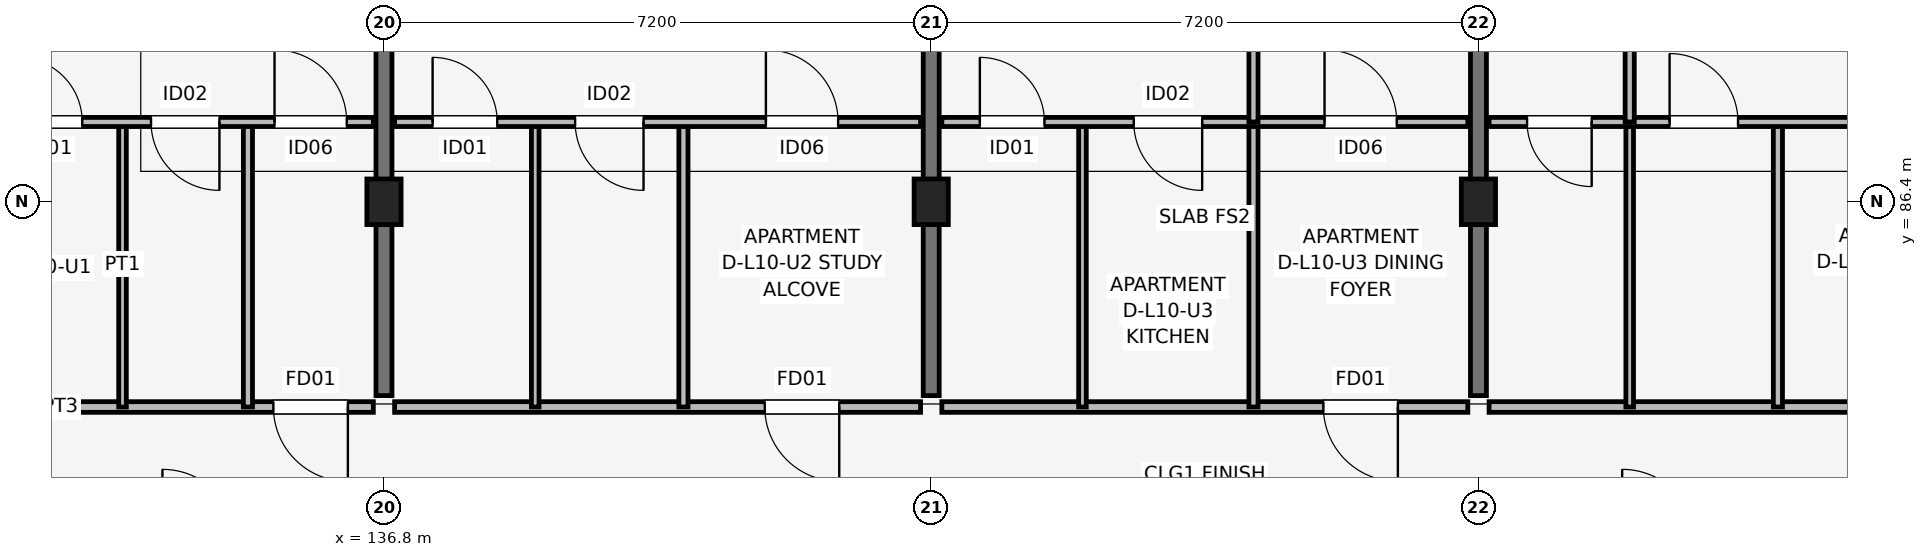
"""IFC4 building model, lengths in metres.
Left out: names, types, materials, properties, quantities, classifications, styles, units other than length and angle.
Written with IfcOpenShell. Run it as: python <this file> out.ifc"""

import sys

from ifc_helpers import new_model, si_unit, direction, frame, frame_2d, origin, origin_2d, place, context, subcontext, project, spatial, rectangle, extrude, element, fill, save


model = new_model("IFC4")
c1 = context("Model", 3, precision=1e-05, world=origin(), true_north=direction((0.0, 1.0)))
c2 = subcontext(c1, "Body", "Model", "MODEL_VIEW")
j1 = project(units=[si_unit("LENGTHUNIT", "METRE"), si_unit("PLANEANGLEUNIT", "RADIAN")], contexts=[c1])
p1 = place(None, origin())
s1 = spatial("IfcSite", under=j1, at=p1, CompositionType="ELEMENT")
p2 = place(p1, origin())
s2 = spatial("IfcBuilding", under=s1, at=p2, CompositionType="ELEMENT")
p3 = place(p2, frame((0.0, 0.0, 33.9)))
s3 = spatial("IfcBuildingStorey", under=s2, at=p3, CompositionType="ELEMENT", Elevation=33.9)
for number, where, z_axis, x_axis in (
    (1, (136.8, 86.4, 0.0), (0.0, 0.0, 1.0), (1.0, 0.0, 0.0)),
    (2, (144.0, 86.4, 0.0), (0.0, 0.0, 1.0), (1.0, 0.0, 0.0)),
    (3, (151.2, 86.4, 0.0), (0.0, 0.0, 1.0), (1.0, 0.0, 0.0)),
):
    element("IfcColumn", number, at=place(p3, frame(where, z_axis=z_axis, x_axis=x_axis)), inside=s3, PredefinedType="COLUMN", context=c2, shape_type="SweptSolid", body=[
        extrude(rectangle(XDim=0.45, YDim=0.6, at=origin_2d()), origin(), (0.0, 0.0, 1.0), 3.15),
    ])
for number, where, z_axis, x_axis in (
    (4, (136.8, 83.85, 0.0), (0.0, 0.0, 1.0), (0.0, 1.0, 0.0)),
    (5, (144.0, 83.85, 0.0), (0.0, 0.0, 1.0), (0.0, 1.0, 0.0)),
    (6, (151.2, 83.85, 0.0), (0.0, 0.0, 1.0), (0.0, 1.0, 0.0)),
):
    element("IfcWall", number, at=place(p3, frame(where, z_axis=z_axis, x_axis=x_axis)), inside=s3, PredefinedType="SHEAR", context=c2, shape_type="SweptSolid", body=[
        extrude(rectangle(XDim=9.4, YDim=0.21, at=frame_2d((4.7, 0.0))), origin(), (0.0, 0.0, 1.0), 3.15),
    ])
p4 = place(p3, frame((129.74, 83.7, 0.0), z_axis=(0.0, 0.0, 1.0), x_axis=(1.0, 0.0, 0.0)))
e7 = element("IfcWall", 7, at=p4, inside=s3, PredefinedType="PARTITIONING", context=c2, shape_type="SweptSolid", body=[
    extrude(rectangle(XDim=6.92, YDim=0.14, at=frame_2d((3.46, 0.0))), origin(), (0.0, 0.0, 1.0), 2.38),
])
p5 = place(p4, frame((6.585, 0.0, 0.0), z_axis=(0.0, 0.0, 1.0), x_axis=(-1.0, 0.0, 0.0)))
e8 = element("IfcOpeningElement", 8, at=p5, cuts=e7, PredefinedType="OPENING", context=c2, shape_type="SweptSolid", body=[
    extrude(rectangle(XDim=0.98, YDim=2.1, at=frame_2d((0.49, 1.05))), frame((0.0, 0.08, 0.0), z_axis=(0.0, -1.0, 0.0), x_axis=(1.0, 0.0, 0.0)), (0.0, 0.0, 1.0), 0.16),
])
p6 = place(p3, frame((133.36, 83.7, 0.0), z_axis=(0.0, 0.0, 1.0), x_axis=(0.0, 1.0, 0.0)))
e9 = element("IfcWall", 9, at=p6, inside=s3, PredefinedType="PARTITIONING", context=c2, shape_type="SweptSolid", body=[
    extrude(rectangle(XDim=3.75, YDim=0.1, at=frame_2d((1.875, 0.0))), origin(), (0.0, 0.0, 1.0), 2.38),
])
p7 = place(p3, frame((135.01, 83.7, 0.0), z_axis=(0.0, 0.0, 1.0), x_axis=(0.0, 1.0, 0.0)))
e10 = element("IfcWall", 10, at=p7, inside=s3, PredefinedType="PARTITIONING", context=c2, shape_type="SweptSolid", body=[
    extrude(rectangle(XDim=3.75, YDim=0.12, at=frame_2d((1.875, 0.0))), origin(), (0.0, 0.0, 1.0), 2.38),
])
p8 = place(p3, frame((129.74, 87.45, 0.0), z_axis=(0.0, 0.0, 1.0), x_axis=(1.0, 0.0, 0.0)))
e11 = element("IfcWall", 11, at=p8, inside=s3, PredefinedType="PARTITIONING", context=c2, shape_type="SweptSolid", body=[
    extrude(rectangle(XDim=6.92, YDim=0.12, at=frame_2d((3.46, 0.0))), origin(), (0.0, 0.0, 1.0), 2.38),
])
p9 = place(p8, frame((2.24, 0.0, 0.0)))
e12 = element("IfcOpeningElement", 12, at=p9, cuts=e11, PredefinedType="OPENING", context=c2, shape_type="SweptSolid", body=[
    extrude(rectangle(XDim=0.85, YDim=2.08, at=frame_2d((0.425, 1.04))), frame((0.0, 0.07, 0.0), z_axis=(0.0, -1.0, 0.0), x_axis=(1.0, 0.0, 0.0)), (0.0, 0.0, 1.0), 0.14),
])
p10 = place(p8, frame((4.895, 0.0, 0.0), z_axis=(0.0, 0.0, 1.0), x_axis=(-1.0, 0.0, 0.0)))
e13 = element("IfcOpeningElement", 13, at=p10, cuts=e11, PredefinedType="OPENING", context=c2, shape_type="SweptSolid", body=[
    extrude(rectangle(XDim=0.9, YDim=2.08, at=frame_2d((0.45, 1.04))), frame((0.0, 0.07, 0.0), z_axis=(0.0, -1.0, 0.0), x_axis=(1.0, 0.0, 0.0)), (0.0, 0.0, 1.0), 0.14),
])
p11 = place(p8, frame((5.62, 0.0, 0.0)))
e14 = element("IfcOpeningElement", 14, at=p11, cuts=e11, PredefinedType="OPENING", context=c2, shape_type="SweptSolid", body=[
    extrude(rectangle(XDim=0.95, YDim=2.08, at=frame_2d((0.475, 1.04))), frame((0.0, 0.07, 0.0), z_axis=(0.0, -1.0, 0.0), x_axis=(1.0, 0.0, 0.0)), (0.0, 0.0, 1.0), 0.14),
])
p12 = place(p3, frame((136.94, 83.7, 0.0), z_axis=(0.0, 0.0, 1.0), x_axis=(1.0, 0.0, 0.0)))
e15 = element("IfcWall", 15, at=p12, inside=s3, PredefinedType="PARTITIONING", context=c2, shape_type="SweptSolid", body=[
    extrude(rectangle(XDim=6.92, YDim=0.14, at=frame_2d((3.46, 0.0))), origin(), (0.0, 0.0, 1.0), 2.38),
])
p13 = place(p12, frame((5.85, 0.0, 0.0), z_axis=(0.0, 0.0, 1.0), x_axis=(-1.0, 0.0, 0.0)))
e16 = element("IfcOpeningElement", 16, at=p13, cuts=e15, PredefinedType="OPENING", context=c2, shape_type="SweptSolid", body=[
    extrude(rectangle(XDim=0.98, YDim=2.1, at=frame_2d((0.49, 1.05))), frame((0.0, 0.08, 0.0), z_axis=(0.0, -1.0, 0.0), x_axis=(1.0, 0.0, 0.0)), (0.0, 0.0, 1.0), 0.16),
])
p14 = place(p3, frame((138.79, 83.7, 0.0), z_axis=(0.0, 0.0, 1.0), x_axis=(0.0, 1.0, 0.0)))
e17 = element("IfcWall", 17, at=p14, inside=s3, PredefinedType="PARTITIONING", context=c2, shape_type="SweptSolid", body=[
    extrude(rectangle(XDim=3.75, YDim=0.1, at=frame_2d((1.875, 0.0))), origin(), (0.0, 0.0, 1.0), 2.38),
])
p15 = place(p3, frame((140.74, 83.7, 0.0), z_axis=(0.0, 0.0, 1.0), x_axis=(0.0, 1.0, 0.0)))
e18 = element("IfcWall", 18, at=p15, inside=s3, PredefinedType="PARTITIONING", context=c2, shape_type="SweptSolid", body=[
    extrude(rectangle(XDim=3.75, YDim=0.12, at=frame_2d((1.875, 0.0))), origin(), (0.0, 0.0, 1.0), 2.38),
])
p16 = place(p3, frame((136.94, 87.45, 0.0), z_axis=(0.0, 0.0, 1.0), x_axis=(1.0, 0.0, 0.0)))
e19 = element("IfcWall", 19, at=p16, inside=s3, PredefinedType="PARTITIONING", context=c2, shape_type="SweptSolid", body=[
    extrude(rectangle(XDim=6.92, YDim=0.12, at=frame_2d((3.46, 0.0))), origin(), (0.0, 0.0, 1.0), 2.38),
])
p17 = place(p16, frame((0.5, 0.0, 0.0)))
e20 = element("IfcOpeningElement", 20, at=p17, cuts=e19, PredefinedType="OPENING", context=c2, shape_type="SweptSolid", body=[
    extrude(rectangle(XDim=0.85, YDim=2.08, at=frame_2d((0.425, 1.04))), frame((0.0, 0.07, 0.0), z_axis=(0.0, -1.0, 0.0), x_axis=(1.0, 0.0, 0.0)), (0.0, 0.0, 1.0), 0.14),
])
p18 = place(p16, frame((3.275, 0.0, 0.0), z_axis=(0.0, 0.0, 1.0), x_axis=(-1.0, 0.0, 0.0)))
e21 = element("IfcOpeningElement", 21, at=p18, cuts=e19, PredefinedType="OPENING", context=c2, shape_type="SweptSolid", body=[
    extrude(rectangle(XDim=0.9, YDim=2.08, at=frame_2d((0.45, 1.04))), frame((0.0, 0.07, 0.0), z_axis=(0.0, -1.0, 0.0), x_axis=(1.0, 0.0, 0.0)), (0.0, 0.0, 1.0), 0.14),
])
p19 = place(p16, frame((4.885, 0.0, 0.0)))
e22 = element("IfcOpeningElement", 22, at=p19, cuts=e19, PredefinedType="OPENING", context=c2, shape_type="SweptSolid", body=[
    extrude(rectangle(XDim=0.95, YDim=2.08, at=frame_2d((0.475, 1.04))), frame((0.0, 0.07, 0.0), z_axis=(0.0, -1.0, 0.0), x_axis=(1.0, 0.0, 0.0)), (0.0, 0.0, 1.0), 0.14),
])
p20 = place(p3, frame((144.14, 83.7, 0.0), z_axis=(0.0, 0.0, 1.0), x_axis=(1.0, 0.0, 0.0)))
e23 = element("IfcWall", 23, at=p20, inside=s3, PredefinedType="PARTITIONING", context=c2, shape_type="SweptSolid", body=[
    extrude(rectangle(XDim=6.92, YDim=0.14, at=frame_2d((3.46, 0.0))), origin(), (0.0, 0.0, 1.0), 2.38),
])
p21 = place(p20, frame((6.0, 0.0, 0.0), z_axis=(0.0, 0.0, 1.0), x_axis=(-1.0, 0.0, 0.0)))
e24 = element("IfcOpeningElement", 24, at=p21, cuts=e23, PredefinedType="OPENING", context=c2, shape_type="SweptSolid", body=[
    extrude(rectangle(XDim=0.98, YDim=2.1, at=frame_2d((0.49, 1.05))), frame((0.0, 0.08, 0.0), z_axis=(0.0, -1.0, 0.0), x_axis=(1.0, 0.0, 0.0)), (0.0, 0.0, 1.0), 0.16),
])
p22 = place(p3, frame((145.99, 83.7, 0.0), z_axis=(0.0, 0.0, 1.0), x_axis=(0.0, 1.0, 0.0)))
e25 = element("IfcWall", 25, at=p22, inside=s3, PredefinedType="PARTITIONING", context=c2, shape_type="SweptSolid", body=[
    extrude(rectangle(XDim=3.75, YDim=0.1, at=frame_2d((1.875, 0.0))), origin(), (0.0, 0.0, 1.0), 2.38),
])
p23 = place(p3, frame((148.24, 83.7, 0.0), z_axis=(0.0, 0.0, 1.0), x_axis=(0.0, 1.0, 0.0)))
e26 = element("IfcWall", 26, at=p23, inside=s3, PredefinedType="PARTITIONING", context=c2, shape_type="SweptSolid", body=[
    extrude(rectangle(XDim=3.75, YDim=0.12, at=frame_2d((1.875, 0.0))), origin(), (0.0, 0.0, 1.0), 2.38),
])
p24 = place(p3, frame((144.14, 87.45, 0.0), z_axis=(0.0, 0.0, 1.0), x_axis=(1.0, 0.0, 0.0)))
e27 = element("IfcWall", 27, at=p24, inside=s3, PredefinedType="PARTITIONING", context=c2, shape_type="SweptSolid", body=[
    extrude(rectangle(XDim=6.92, YDim=0.12, at=frame_2d((3.46, 0.0))), origin(), (0.0, 0.0, 1.0), 2.38),
])
p25 = place(p24, frame((0.5, 0.0, 0.0)))
e28 = element("IfcOpeningElement", 28, at=p25, cuts=e27, PredefinedType="OPENING", context=c2, shape_type="SweptSolid", body=[
    extrude(rectangle(XDim=0.85, YDim=2.08, at=frame_2d((0.425, 1.04))), frame((0.0, 0.07, 0.0), z_axis=(0.0, -1.0, 0.0), x_axis=(1.0, 0.0, 0.0)), (0.0, 0.0, 1.0), 0.14),
])
p26 = place(p24, frame((3.425, 0.0, 0.0), z_axis=(0.0, 0.0, 1.0), x_axis=(-1.0, 0.0, 0.0)))
e29 = element("IfcOpeningElement", 29, at=p26, cuts=e27, PredefinedType="OPENING", context=c2, shape_type="SweptSolid", body=[
    extrude(rectangle(XDim=0.9, YDim=2.08, at=frame_2d((0.45, 1.04))), frame((0.0, 0.07, 0.0), z_axis=(0.0, -1.0, 0.0), x_axis=(1.0, 0.0, 0.0)), (0.0, 0.0, 1.0), 0.14),
])
p27 = place(p24, frame((5.035, 0.0, 0.0)))
e30 = element("IfcOpeningElement", 30, at=p27, cuts=e27, PredefinedType="OPENING", context=c2, shape_type="SweptSolid", body=[
    extrude(rectangle(XDim=0.95, YDim=2.08, at=frame_2d((0.475, 1.04))), frame((0.0, 0.07, 0.0), z_axis=(0.0, -1.0, 0.0), x_axis=(1.0, 0.0, 0.0)), (0.0, 0.0, 1.0), 0.14),
])
p28 = place(p3, frame((148.24, 87.45, 0.0), z_axis=(0.0, 0.0, 1.0), x_axis=(0.0, 1.0, 0.0)))
e31 = element("IfcWall", 31, at=p28, inside=s3, PredefinedType="PARTITIONING", context=c2, shape_type="SweptSolid", body=[
    extrude(rectangle(XDim=5.85, YDim=0.12, at=frame_2d((2.925, 0.0))), origin(), (0.0, 0.0, 1.0), 2.38),
])
p29 = place(p28, frame((3.375, 0.0, 0.0), z_axis=(0.0, 0.0, 1.0), x_axis=(-1.0, 0.0, 0.0)))
e32 = element("IfcOpeningElement", 32, at=p29, cuts=e31, PredefinedType="OPENING", context=c2, shape_type="SweptSolid", body=[
    extrude(rectangle(XDim=0.9, YDim=2.08, at=frame_2d((0.45, 1.04))), frame((0.0, 0.07, 0.0), z_axis=(0.0, -1.0, 0.0), x_axis=(1.0, 0.0, 0.0)), (0.0, 0.0, 1.0), 0.14),
])
p30 = place(p3, frame((151.34, 83.7, 0.0), z_axis=(0.0, 0.0, 1.0), x_axis=(1.0, 0.0, 0.0)))
e33 = element("IfcWall", 33, at=p30, inside=s3, PredefinedType="PARTITIONING", context=c2, shape_type="SweptSolid", body=[
    extrude(rectangle(XDim=6.92, YDim=0.14, at=frame_2d((3.46, 0.0))), origin(), (0.0, 0.0, 1.0), 2.38),
])
p31 = place(p30, frame((4.87, 0.0, 0.0)))
e34 = element("IfcOpeningElement", 34, at=p31, cuts=e33, PredefinedType="OPENING", context=c2, shape_type="SweptSolid", body=[
    extrude(rectangle(XDim=0.98, YDim=2.1, at=frame_2d((0.49, 1.05))), frame((0.0, 0.08, 0.0), z_axis=(0.0, -1.0, 0.0), x_axis=(1.0, 0.0, 0.0)), (0.0, 0.0, 1.0), 0.16),
])
p32 = place(p3, frame((153.19, 83.7, 0.0), z_axis=(0.0, 0.0, 1.0), x_axis=(0.0, 1.0, 0.0)))
e35 = element("IfcWall", 35, at=p32, inside=s3, PredefinedType="PARTITIONING", context=c2, shape_type="SweptSolid", body=[
    extrude(rectangle(XDim=3.75, YDim=0.1, at=frame_2d((1.875, 0.0))), origin(), (0.0, 0.0, 1.0), 2.38),
])
p33 = place(p3, frame((155.14, 83.7, 0.0), z_axis=(0.0, 0.0, 1.0), x_axis=(0.0, 1.0, 0.0)))
e36 = element("IfcWall", 36, at=p33, inside=s3, PredefinedType="PARTITIONING", context=c2, shape_type="SweptSolid", body=[
    extrude(rectangle(XDim=3.75, YDim=0.12, at=frame_2d((1.875, 0.0))), origin(), (0.0, 0.0, 1.0), 2.38),
])
p34 = place(p3, frame((151.34, 87.45, 0.0), z_axis=(0.0, 0.0, 1.0), x_axis=(1.0, 0.0, 0.0)))
e37 = element("IfcWall", 37, at=p34, inside=s3, PredefinedType="PARTITIONING", context=c2, shape_type="SweptSolid", body=[
    extrude(rectangle(XDim=6.92, YDim=0.12, at=frame_2d((3.46, 0.0))), origin(), (0.0, 0.0, 1.0), 2.38),
])
p35 = place(p34, frame((1.35, 0.0, 0.0), z_axis=(0.0, 0.0, 1.0), x_axis=(-1.0, 0.0, 0.0)))
e38 = element("IfcOpeningElement", 38, at=p35, cuts=e37, PredefinedType="OPENING", context=c2, shape_type="SweptSolid", body=[
    extrude(rectangle(XDim=0.85, YDim=2.08, at=frame_2d((0.425, 1.04))), frame((0.0, 0.07, 0.0), z_axis=(0.0, -1.0, 0.0), x_axis=(1.0, 0.0, 0.0)), (0.0, 0.0, 1.0), 0.14),
])
p36 = place(p34, frame((2.375, 0.0, 0.0)))
e39 = element("IfcOpeningElement", 39, at=p36, cuts=e37, PredefinedType="OPENING", context=c2, shape_type="SweptSolid", body=[
    extrude(rectangle(XDim=0.9, YDim=2.08, at=frame_2d((0.45, 1.04))), frame((0.0, 0.07, 0.0), z_axis=(0.0, -1.0, 0.0), x_axis=(1.0, 0.0, 0.0)), (0.0, 0.0, 1.0), 0.14),
])
p37 = place(p34, frame((5.835, 0.0, 0.0), z_axis=(0.0, 0.0, 1.0), x_axis=(-1.0, 0.0, 0.0)))
e40 = element("IfcOpeningElement", 40, at=p37, cuts=e37, PredefinedType="OPENING", context=c2, shape_type="SweptSolid", body=[
    extrude(rectangle(XDim=0.95, YDim=2.08, at=frame_2d((0.475, 1.04))), frame((0.0, 0.07, 0.0), z_axis=(0.0, -1.0, 0.0), x_axis=(1.0, 0.0, 0.0)), (0.0, 0.0, 1.0), 0.14),
])
p38 = place(p3, frame((153.19, 87.45, 0.0), z_axis=(0.0, 0.0, 1.0), x_axis=(0.0, 1.0, 0.0)))
e41 = element("IfcWall", 41, at=p38, inside=s3, PredefinedType="PARTITIONING", context=c2, shape_type="SweptSolid", body=[
    extrude(rectangle(XDim=5.85, YDim=0.12, at=frame_2d((2.925, 0.0))), origin(), (0.0, 0.0, 1.0), 2.38),
])
p39 = place(p38, frame((2.475, 0.0, 0.0)))
e42 = element("IfcOpeningElement", 42, at=p39, cuts=e41, PredefinedType="OPENING", context=c2, shape_type="SweptSolid", body=[
    extrude(rectangle(XDim=0.9, YDim=2.08, at=frame_2d((0.45, 1.04))), frame((0.0, 0.07, 0.0), z_axis=(0.0, -1.0, 0.0), x_axis=(1.0, 0.0, 0.0)), (0.0, 0.0, 1.0), 0.14),
])
p40 = place(p5, origin())
e43 = element("IfcDoor", 43, at=p40, inside=s3, OperationType="SINGLE_SWING_RIGHT", PredefinedType="DOOR", context=c2, shape_type="SweptSolid", body=[
    extrude(rectangle(XDim=0.98, YDim=2.1, at=frame_2d((0.49, 1.05))), frame((0.0, 0.025, 0.0), z_axis=(0.0, -1.0, 0.0), x_axis=(1.0, 0.0, 0.0)), (0.0, 0.0, 1.0), 0.05),
])
fill(e8, e43)
p41 = place(p9, origin())
e44 = element("IfcDoor", 44, at=p41, inside=s3, OperationType="SINGLE_SWING_LEFT", PredefinedType="DOOR", context=c2, shape_type="SweptSolid", body=[
    extrude(rectangle(XDim=0.85, YDim=2.08, at=frame_2d((0.425, 1.04))), frame((0.0, 0.025, 0.0), z_axis=(0.0, -1.0, 0.0), x_axis=(1.0, 0.0, 0.0)), (0.0, 0.0, 1.0), 0.05),
])
fill(e12, e44)
p42 = place(p10, origin())
e45 = element("IfcDoor", 45, at=p42, inside=s3, OperationType="SINGLE_SWING_RIGHT", PredefinedType="DOOR", context=c2, shape_type="SweptSolid", body=[
    extrude(rectangle(XDim=0.9, YDim=2.08, at=frame_2d((0.45, 1.04))), frame((0.0, 0.025, 0.0), z_axis=(0.0, -1.0, 0.0), x_axis=(1.0, 0.0, 0.0)), (0.0, 0.0, 1.0), 0.05),
])
fill(e13, e45)
p43 = place(p11, origin())
e46 = element("IfcDoor", 46, at=p43, inside=s3, OperationType="SINGLE_SWING_LEFT", PredefinedType="DOOR", context=c2, shape_type="SweptSolid", body=[
    extrude(rectangle(XDim=0.95, YDim=2.08, at=frame_2d((0.475, 1.04))), frame((0.0, 0.025, 0.0), z_axis=(0.0, -1.0, 0.0), x_axis=(1.0, 0.0, 0.0)), (0.0, 0.0, 1.0), 0.05),
])
fill(e14, e46)
p44 = place(p13, origin())
e47 = element("IfcDoor", 47, at=p44, inside=s3, OperationType="SINGLE_SWING_RIGHT", PredefinedType="DOOR", context=c2, shape_type="SweptSolid", body=[
    extrude(rectangle(XDim=0.98, YDim=2.1, at=frame_2d((0.49, 1.05))), frame((0.0, 0.025, 0.0), z_axis=(0.0, -1.0, 0.0), x_axis=(1.0, 0.0, 0.0)), (0.0, 0.0, 1.0), 0.05),
])
fill(e16, e47)
p45 = place(p17, origin())
e48 = element("IfcDoor", 48, at=p45, inside=s3, OperationType="SINGLE_SWING_LEFT", PredefinedType="DOOR", context=c2, shape_type="SweptSolid", body=[
    extrude(rectangle(XDim=0.85, YDim=2.08, at=frame_2d((0.425, 1.04))), frame((0.0, 0.025, 0.0), z_axis=(0.0, -1.0, 0.0), x_axis=(1.0, 0.0, 0.0)), (0.0, 0.0, 1.0), 0.05),
])
fill(e20, e48)
p46 = place(p18, origin())
e49 = element("IfcDoor", 49, at=p46, inside=s3, OperationType="SINGLE_SWING_RIGHT", PredefinedType="DOOR", context=c2, shape_type="SweptSolid", body=[
    extrude(rectangle(XDim=0.9, YDim=2.08, at=frame_2d((0.45, 1.04))), frame((0.0, 0.025, 0.0), z_axis=(0.0, -1.0, 0.0), x_axis=(1.0, 0.0, 0.0)), (0.0, 0.0, 1.0), 0.05),
])
fill(e21, e49)
p47 = place(p19, origin())
e50 = element("IfcDoor", 50, at=p47, inside=s3, OperationType="SINGLE_SWING_LEFT", PredefinedType="DOOR", context=c2, shape_type="SweptSolid", body=[
    extrude(rectangle(XDim=0.95, YDim=2.08, at=frame_2d((0.475, 1.04))), frame((0.0, 0.025, 0.0), z_axis=(0.0, -1.0, 0.0), x_axis=(1.0, 0.0, 0.0)), (0.0, 0.0, 1.0), 0.05),
])
fill(e22, e50)
p48 = place(p21, origin())
e51 = element("IfcDoor", 51, at=p48, inside=s3, OperationType="SINGLE_SWING_RIGHT", PredefinedType="DOOR", context=c2, shape_type="SweptSolid", body=[
    extrude(rectangle(XDim=0.98, YDim=2.1, at=frame_2d((0.49, 1.05))), frame((0.0, 0.025, 0.0), z_axis=(0.0, -1.0, 0.0), x_axis=(1.0, 0.0, 0.0)), (0.0, 0.0, 1.0), 0.05),
])
fill(e24, e51)
p49 = place(p25, origin())
e52 = element("IfcDoor", 52, at=p49, inside=s3, OperationType="SINGLE_SWING_LEFT", PredefinedType="DOOR", context=c2, shape_type="SweptSolid", body=[
    extrude(rectangle(XDim=0.85, YDim=2.08, at=frame_2d((0.425, 1.04))), frame((0.0, 0.025, 0.0), z_axis=(0.0, -1.0, 0.0), x_axis=(1.0, 0.0, 0.0)), (0.0, 0.0, 1.0), 0.05),
])
fill(e28, e52)
p50 = place(p26, origin())
e53 = element("IfcDoor", 53, at=p50, inside=s3, OperationType="SINGLE_SWING_RIGHT", PredefinedType="DOOR", context=c2, shape_type="SweptSolid", body=[
    extrude(rectangle(XDim=0.9, YDim=2.08, at=frame_2d((0.45, 1.04))), frame((0.0, 0.025, 0.0), z_axis=(0.0, -1.0, 0.0), x_axis=(1.0, 0.0, 0.0)), (0.0, 0.0, 1.0), 0.05),
])
fill(e29, e53)
p51 = place(p27, origin())
e54 = element("IfcDoor", 54, at=p51, inside=s3, OperationType="SINGLE_SWING_LEFT", PredefinedType="DOOR", context=c2, shape_type="SweptSolid", body=[
    extrude(rectangle(XDim=0.95, YDim=2.08, at=frame_2d((0.475, 1.04))), frame((0.0, 0.025, 0.0), z_axis=(0.0, -1.0, 0.0), x_axis=(1.0, 0.0, 0.0)), (0.0, 0.0, 1.0), 0.05),
])
fill(e30, e54)
p52 = place(p35, origin())
e55 = element("IfcDoor", 55, at=p52, inside=s3, OperationType="SINGLE_SWING_RIGHT", PredefinedType="DOOR", context=c2, shape_type="SweptSolid", body=[
    extrude(rectangle(XDim=0.85, YDim=2.08, at=frame_2d((0.425, 1.04))), frame((0.0, 0.025, 0.0), z_axis=(0.0, -1.0, 0.0), x_axis=(1.0, 0.0, 0.0)), (0.0, 0.0, 1.0), 0.05),
])
fill(e38, e55)
p53 = place(p36, origin())
e56 = element("IfcDoor", 56, at=p53, inside=s3, OperationType="SINGLE_SWING_LEFT", PredefinedType="DOOR", context=c2, shape_type="SweptSolid", body=[
    extrude(rectangle(XDim=0.9, YDim=2.08, at=frame_2d((0.45, 1.04))), frame((0.0, 0.025, 0.0), z_axis=(0.0, -1.0, 0.0), x_axis=(1.0, 0.0, 0.0)), (0.0, 0.0, 1.0), 0.05),
])
fill(e39, e56)
save(model, sys.argv[1])
